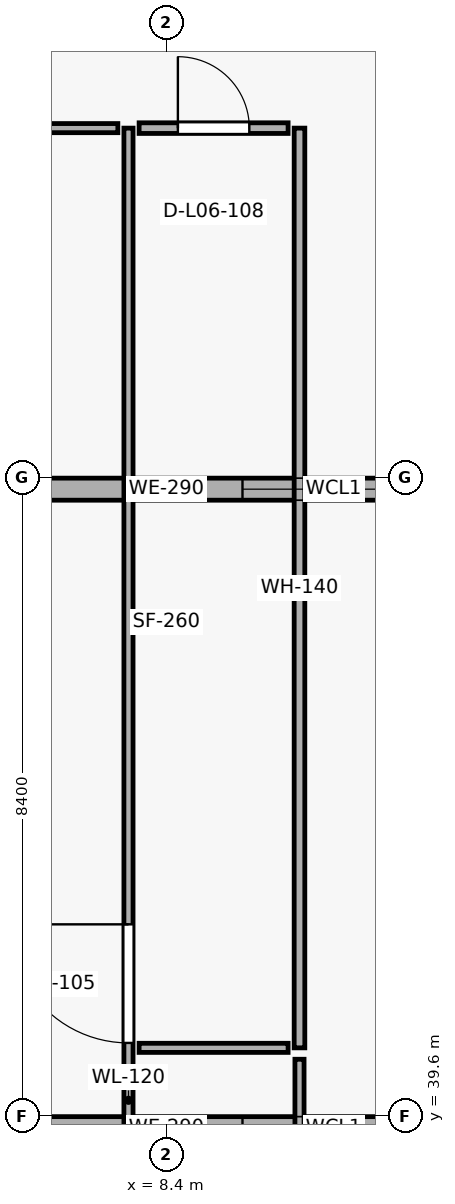
"""IFC4 building model, lengths in metres.
Left out: names, types, materials, properties, quantities, classifications, styles, units other than length and angle.
Written with IfcOpenShell. Run it as: python <this file> out.ifc"""

import sys

from ifc_helpers import new_model, si_unit, direction, frame, frame_2d, origin, place, context, subcontext, project, spatial, rectangle, extrude, element, fill, save


model = new_model("IFC4")
c1 = context("Model", 3, precision=1e-05, world=origin(), true_north=direction((0.0, 1.0)))
c2 = subcontext(c1, "Body", "Model", "MODEL_VIEW")
j1 = project(units=[si_unit("LENGTHUNIT", "METRE"), si_unit("PLANEANGLEUNIT", "RADIAN")], contexts=[c1])
p1 = place(None, origin())
s1 = spatial("IfcSite", under=j1, at=p1, CompositionType="ELEMENT")
p2 = place(p1, origin())
s2 = spatial("IfcBuilding", under=s1, at=p2, CompositionType="ELEMENT")
p3 = place(p2, frame((0.0, 0.0, 25.5)))
s3 = spatial("IfcBuildingStorey", under=s2, at=p3, CompositionType="ELEMENT", Elevation=25.5)
p4 = place(p3, frame((0.8, 39.45, 5.1), z_axis=(0.0, 0.0, 1.0), x_axis=(1.0, 0.0, 0.0)))
e1 = element("IfcWall", 1, at=p4, inside=s3, PredefinedType="SOLIDWALL", context=c2, shape_type="SweptSolid", body=[
    extrude(rectangle(XDim=15.2, YDim=0.29, at=frame_2d((7.6, 0.0))), origin(), (0.0, 0.0, 1.0), 2.55),
])
p5 = place(p4, frame((2.2, 0.0, 0.45)))
e2 = element("IfcOpeningElement", 2, at=p5, cuts=e1, PredefinedType="OPENING", context=c2, shape_type="SweptSolid", body=[
    extrude(rectangle(XDim=2.4, YDim=1.35, at=frame_2d((1.2, 0.675))), frame((0.0, 0.155, 0.0), z_axis=(0.0, -1.0, 0.0), x_axis=(1.0, 0.0, 0.0)), (0.0, 0.0, 1.0), 0.31),
])
p6 = place(p4, frame((8.6, 0.0, 0.45)))
e3 = element("IfcOpeningElement", 3, at=p6, cuts=e1, PredefinedType="OPENING", context=c2, shape_type="SweptSolid", body=[
    extrude(rectangle(XDim=2.4, YDim=1.35, at=frame_2d((1.2, 0.675))), frame((0.0, 0.155, 0.0), z_axis=(0.0, -1.0, 0.0), x_axis=(1.0, 0.0, 0.0)), (0.0, 0.0, 1.0), 0.31),
])
p7 = place(p3, frame((0.8, 47.85, 5.1), z_axis=(0.0, 0.0, 1.0), x_axis=(1.0, 0.0, 0.0)))
e4 = element("IfcWall", 4, at=p7, inside=s3, PredefinedType="SOLIDWALL", context=c2, shape_type="SweptSolid", body=[
    extrude(rectangle(XDim=15.2, YDim=0.29, at=frame_2d((7.6, 0.0))), origin(), (0.0, 0.0, 1.0), 2.55),
])
p8 = place(p7, frame((2.2, 0.0, 0.45)))
e5 = element("IfcOpeningElement", 5, at=p8, cuts=e4, PredefinedType="OPENING", context=c2, shape_type="SweptSolid", body=[
    extrude(rectangle(XDim=2.4, YDim=1.35, at=frame_2d((1.2, 0.675))), frame((0.0, 0.155, 0.0), z_axis=(0.0, -1.0, 0.0), x_axis=(1.0, 0.0, 0.0)), (0.0, 0.0, 1.0), 0.31),
])
p9 = place(p7, frame((8.6, 0.0, 0.45)))
e6 = element("IfcOpeningElement", 6, at=p9, cuts=e4, PredefinedType="OPENING", context=c2, shape_type="SweptSolid", body=[
    extrude(rectangle(XDim=2.4, YDim=1.35, at=frame_2d((1.2, 0.675))), frame((0.0, 0.155, 0.0), z_axis=(0.0, -1.0, 0.0), x_axis=(1.0, 0.0, 0.0)), (0.0, 0.0, 1.0), 0.31),
])
p10 = place(p3, frame((7.9, 52.6, 0.0), z_axis=(0.0, 0.0, 1.0), x_axis=(0.0, -1.0, 0.0)))
e7 = element("IfcWall", 7, at=p10, inside=s3, PredefinedType="PARTITIONING", context=c2, shape_type="SweptSolid", body=[
    extrude(rectangle(XDim=25.58, YDim=0.12, at=frame_2d((12.79, 0.0))), origin(), (0.0, 0.0, 1.0), 4.82),
])
p11 = place(p10, frame((10.475, 0.0, 0.0)))
e8 = element("IfcOpeningElement", 8, at=p11, cuts=e7, PredefinedType="OPENING", context=c2, shape_type="SweptSolid", body=[
    extrude(rectangle(XDim=1.56, YDim=2.44, at=frame_2d((0.78, 1.22))), frame((0.0, 0.07, 0.0), z_axis=(0.0, -1.0, 0.0), x_axis=(1.0, 0.0, 0.0)), (0.0, 0.0, 1.0), 0.14),
])
p12 = place(p3, frame((10.15, 52.6, 0.0), z_axis=(0.0, 0.0, 1.0), x_axis=(0.0, -1.0, 0.0)))
e9 = element("IfcWall", 9, at=p12, inside=s3, PredefinedType="PARTITIONING", context=c2, shape_type="SweptSolid", body=[
    extrude(rectangle(XDim=12.1, YDim=0.14, at=frame_2d((6.05, 0.0))), origin(), (0.0, 0.0, 1.0), 4.82),
])
p13 = place(p3, frame((10.15, 40.35, 0.0), z_axis=(0.0, 0.0, 1.0), x_axis=(0.0, -1.0, 0.0)))
e10 = element("IfcWall", 10, at=p13, inside=s3, PredefinedType="PARTITIONING", context=c2, shape_type="SweptSolid", body=[
    extrude(rectangle(XDim=10.95, YDim=0.12, at=frame_2d((5.475, 0.0))), origin(), (0.0, 0.0, 1.0), 4.82),
])
p14 = place(p3, frame((3.74, 52.6, 0.0), z_axis=(0.0, 0.0, 1.0), x_axis=(1.0, 0.0, 0.0)))
e11 = element("IfcWall", 11, at=p14, inside=s3, PredefinedType="PARTITIONING", context=c2, shape_type="SweptSolid", body=[
    extrude(rectangle(XDim=4.02, YDim=0.12, at=frame_2d((2.01, 0.0))), origin(), (0.0, 0.0, 1.0), 4.82),
])
p15 = place(p3, frame((8.04, 40.5, 0.0), z_axis=(0.0, 0.0, 1.0), x_axis=(1.0, 0.0, 0.0)))
e12 = element("IfcWall", 12, at=p15, inside=s3, PredefinedType="PARTITIONING", context=c2, shape_type="SweptSolid", body=[
    extrude(rectangle(XDim=1.96, YDim=0.12, at=frame_2d((0.98, 0.0))), origin(), (0.0, 0.0, 1.0), 4.82),
])
p16 = place(p3, frame((8.04, 52.6, 0.0), z_axis=(0.0, 0.0, 1.0), x_axis=(1.0, 0.0, 0.0)))
e13 = element("IfcWall", 13, at=p16, inside=s3, PredefinedType="PARTITIONING", context=c2, shape_type="SweptSolid", body=[
    extrude(rectangle(XDim=1.96, YDim=0.14, at=frame_2d((0.98, 0.0))), origin(), (0.0, 0.0, 1.0), 4.82),
])
p17 = place(p16, frame((0.51, 0.0, 0.0)))
e14 = element("IfcOpeningElement", 14, at=p17, cuts=e13, PredefinedType="OPENING", context=c2, shape_type="SweptSolid", body=[
    extrude(rectangle(XDim=0.94, YDim=2.18, at=frame_2d((0.47, 1.09))), frame((0.0, 0.08, 0.0), z_axis=(0.0, -1.0, 0.0), x_axis=(1.0, 0.0, 0.0)), (0.0, 0.0, 1.0), 0.16),
])
p18 = place(p9, origin())
e15 = element("IfcWindow", 15, at=p18, inside=s3, PartitioningType="SINGLE_PANEL", PredefinedType="WINDOW", context=c2, shape_type="SweptSolid", body=[
    extrude(rectangle(XDim=2.4, YDim=1.35, at=frame_2d((1.2, 0.675))), frame((0.0, 0.03, 0.0), z_axis=(0.0, -1.0, 0.0), x_axis=(1.0, 0.0, 0.0)), (0.0, 0.0, 1.0), 0.06),
])
fill(e6, e15)
p19 = place(p11, origin())
e16 = element("IfcDoor", 16, at=p19, inside=s3, OperationType="SINGLE_SWING_RIGHT", PredefinedType="DOOR", context=c2, shape_type="SweptSolid", body=[
    extrude(rectangle(XDim=1.56, YDim=2.44, at=frame_2d((0.78, 1.22))), frame((0.0, 0.025, 0.0), z_axis=(0.0, -1.0, 0.0), x_axis=(1.0, 0.0, 0.0)), (0.0, 0.0, 1.0), 0.05),
])
fill(e8, e16)
p20 = place(p17, origin())
e17 = element("IfcDoor", 17, at=p20, inside=s3, OperationType="SINGLE_SWING_LEFT", PredefinedType="DOOR", context=c2, shape_type="SweptSolid", body=[
    extrude(rectangle(XDim=0.94, YDim=2.18, at=frame_2d((0.47, 1.09))), frame((0.0, 0.025, 0.0), z_axis=(0.0, -1.0, 0.0), x_axis=(1.0, 0.0, 0.0)), (0.0, 0.0, 1.0), 0.05),
])
fill(e14, e17)
save(model, sys.argv[1])
